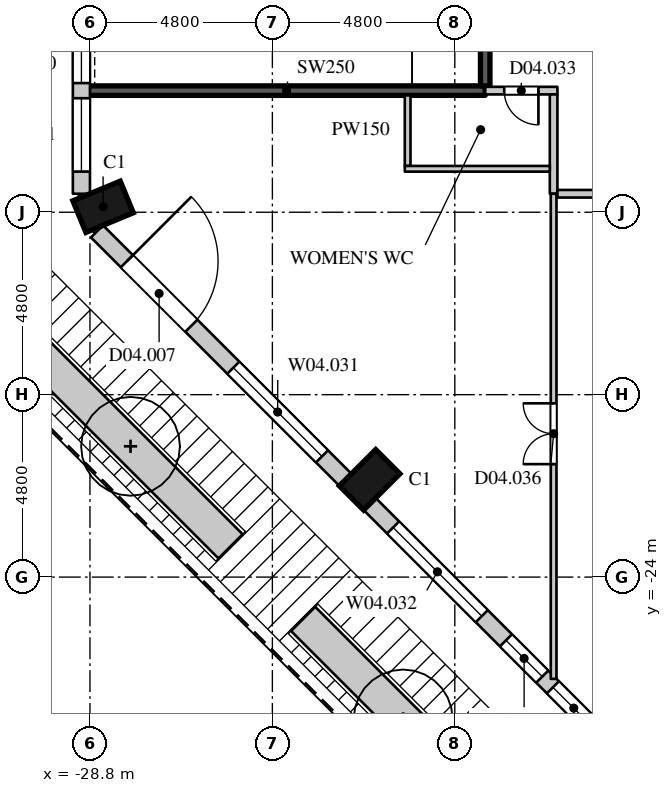
"""IFC4 building model, lengths in metres.
Left out: names, types, materials, properties, quantities, classifications, styles, units other than length and angle.
Written with IfcOpenShell. Run it as: python <this file> out.ifc"""

import sys

from ifc_helpers import new_model, si_unit, direction, frame, frame_2d, origin, origin_2d, place, context, subcontext, project, spatial, rectangle, extrude, element, fill, save


model = new_model("IFC4")
c1 = context("Model", 3, precision=1e-05, world=origin(), true_north=direction((0.0, 1.0)))
c2 = subcontext(c1, "Body", "Model", "MODEL_VIEW")
j1 = project(units=[si_unit("LENGTHUNIT", "METRE"), si_unit("PLANEANGLEUNIT", "RADIAN")], contexts=[c1])
p1 = place(None, origin())
s1 = spatial("IfcSite", under=j1, at=p1, CompositionType="ELEMENT")
p2 = place(p1, origin())
s2 = spatial("IfcBuilding", under=s1, at=p2, CompositionType="ELEMENT")
p3 = place(p2, frame((0.0, 0.0, 21.0)))
s3 = spatial("IfcBuildingStorey", under=s2, at=p3, CompositionType="ELEMENT", Elevation=21.0)
for number, where, z_axis, x_axis in (
    (1, (-28.454, -14.257, 0.0), (0.0, 0.0, 1.0), (0.383, -0.924, 0.0)),
    (2, (-21.441, -21.441, 0.0), (0.0, 0.0, 1.0), (0.707, -0.707, 0.0)),
):
    element("IfcColumn", number, at=place(p3, frame(where, z_axis=z_axis, x_axis=x_axis)), inside=s3, PredefinedType="COLUMN", context=c2, shape_type="SweptSolid", body=[
        extrude(rectangle(XDim=0.9, YDim=1.35, at=origin_2d()), origin(), (0.0, 0.0, 1.0), 4.5),
    ])
p4 = place(p3, frame((-29.025, -5.25, 0.9), z_axis=(0.0, 0.0, 1.0), x_axis=(0.0, -1.0, 0.0)))
e3 = element("IfcWall", 3, at=p4, inside=s3, PredefinedType="ELEMENTEDWALL", context=c2, shape_type="SweptSolid", body=[
    extrude(rectangle(XDim=8.663, YDim=0.45, at=frame_2d((4.332, 0.0))), origin(), (0.0, 0.0, 1.0), 3.3),
])
p5 = place(p4, frame((1.75, 0.0, 0.15)))
e4 = element("IfcOpeningElement", 4, at=p5, cuts=e3, PredefinedType="OPENING", context=c2, shape_type="SweptSolid", body=[
    extrude(rectangle(XDim=2.13, YDim=2.7, at=frame_2d((1.065, 1.35))), frame((0.0, 0.235, 0.0), z_axis=(0.0, -1.0, 0.0), x_axis=(1.0, 0.0, 0.0)), (0.0, 0.0, 1.0), 0.47),
])
p6 = place(p4, frame((4.781, 0.0, 0.15)))
e5 = element("IfcOpeningElement", 5, at=p6, cuts=e3, PredefinedType="OPENING", context=c2, shape_type="SweptSolid", body=[
    extrude(rectangle(XDim=0.97, YDim=2.7, at=frame_2d((0.485, 1.35))), frame((0.0, 0.235, 0.0), z_axis=(0.0, -1.0, 0.0), x_axis=(1.0, 0.0, 0.0)), (0.0, 0.0, 1.0), 0.47),
])
p7 = place(p4, frame((6.15, 0.0, 0.15)))
e6 = element("IfcOpeningElement", 6, at=p7, cuts=e3, PredefinedType="OPENING", context=c2, shape_type="SweptSolid", body=[
    extrude(rectangle(XDim=1.93, YDim=2.7, at=frame_2d((0.965, 1.35))), frame((0.0, 0.235, 0.0), z_axis=(0.0, -1.0, 0.0), x_axis=(1.0, 0.0, 0.0)), (0.0, 0.0, 1.0), 0.47),
])
p8 = place(p3, frame((-28.615, -14.904, 0.0), z_axis=(0.0, 0.0, 1.0), x_axis=(0.707106781187, -0.707106781187, 0.0)))
e7 = element("IfcWall", 7, at=p8, inside=s3, PredefinedType="ELEMENTEDWALL", context=c2, shape_type="SweptSolid", body=[
    extrude(rectangle(XDim=9.245, YDim=0.45, at=frame_2d((4.623, 0.0))), origin(), (0.0, 0.0, 1.0), 4.2),
])
p9 = place(p8, frame((1.111, 0.0, 0.0)))
e8 = element("IfcOpeningElement", 8, at=p9, cuts=e7, PredefinedType="OPENING", context=c2, shape_type="SweptSolid", body=[
    extrude(rectangle(XDim=2.4, YDim=2.7, at=frame_2d((1.2, 1.35))), frame((0.0, 0.235, 0.0), z_axis=(0.0, -1.0, 0.0), x_axis=(1.0, 0.0, 0.0)), (0.0, 0.0, 1.0), 0.47),
])
p10 = place(p8, frame((5.073, 0.0, 1.05)))
e9 = element("IfcOpeningElement", 9, at=p10, cuts=e7, PredefinedType="OPENING", context=c2, shape_type="SweptSolid", body=[
    extrude(rectangle(XDim=3.3, YDim=2.7, at=frame_2d((1.65, 1.35))), frame((0.0, 0.235, 0.0), z_axis=(0.0, -1.0, 0.0), x_axis=(1.0, 0.0, 0.0)), (0.0, 0.0, 1.0), 0.47),
])
p11 = place(p3, frame((-21.441, -22.077, 0.9), z_axis=(0.0, 0.0, 1.0), x_axis=(0.707106781187, -0.707106781187, 0.0)))
e10 = element("IfcWall", 10, at=p11, inside=s3, PredefinedType="ELEMENTEDWALL", context=c2, shape_type="SweptSolid", body=[
    extrude(rectangle(XDim=9.245, YDim=0.45, at=frame_2d((4.623, 0.0))), origin(), (0.0, 0.0, 1.0), 3.3),
])
p12 = place(p11, frame((0.873, 0.0, 0.15)))
e11 = element("IfcOpeningElement", 11, at=p12, cuts=e10, PredefinedType="OPENING", context=c2, shape_type="SweptSolid", body=[
    extrude(rectangle(XDim=3.3, YDim=2.7, at=frame_2d((1.65, 1.35))), frame((0.0, 0.235, 0.0), z_axis=(0.0, -1.0, 0.0), x_axis=(1.0, 0.0, 0.0)), (0.0, 0.0, 1.0), 0.47),
])
p13 = place(p11, frame((5.073, 0.0, 0.15)))
e12 = element("IfcOpeningElement", 12, at=p13, cuts=e10, PredefinedType="OPENING", context=c2, shape_type="SweptSolid", body=[
    extrude(rectangle(XDim=1.35, YDim=2.7, at=frame_2d((0.675, 1.35))), frame((0.0, 0.235, 0.0), z_axis=(0.0, -1.0, 0.0), x_axis=(1.0, 0.0, 0.0)), (0.0, 0.0, 1.0), 0.47),
])
p14 = place(p11, frame((6.821, 0.0, 0.15)))
e13 = element("IfcOpeningElement", 13, at=p14, cuts=e10, PredefinedType="OPENING", context=c2, shape_type="SweptSolid", body=[
    extrude(rectangle(XDim=1.55, YDim=2.7, at=frame_2d((0.775, 1.35))), frame((0.0, 0.235, 0.0), z_axis=(0.0, -1.0, 0.0), x_axis=(1.0, 0.0, 0.0)), (0.0, 0.0, 1.0), 0.47),
])
for number, where, z_axis, x_axis in (
    (14, (-30.365, -17.927, 0.0), (0.0, 0.0, 1.0), (0.707, -0.707, 0.0)),
    (15, (-23.191, -25.1, 0.0), (0.0, 0.0, 1.0), (0.707, -0.707, 0.0)),
):
    element("IfcWall", number, at=place(p3, frame(where, z_axis=z_axis, x_axis=x_axis)), inside=s3, PredefinedType="USERDEFINED", context=c2, shape_type="SweptSolid", body=[
        extrude(rectangle(XDim=7.445, YDim=0.9, at=frame_2d((3.723, 0.0))), origin(), (0.0, 0.0, 1.0), 0.9),
    ])
p15 = place(p3, frame((-18.4, -11.2, 0.0), z_axis=(0.0, 0.0, 1.0), x_axis=(1.0, 0.0, 0.0)))
e16 = element("IfcWall", 16, at=p15, inside=s3, PredefinedType="PARTITIONING", context=c2, shape_type="SweptSolid", body=[
    extrude(rectangle(XDim=1.9, YDim=0.2, at=frame_2d((0.95, 0.0))), origin(), (0.0, 0.0, 1.0), 3.55),
])
p16 = place(p15, frame((0.5, 0.0, 0.0)))
e17 = element("IfcOpeningElement", 17, at=p16, cuts=e16, PredefinedType="OPENING", context=c2, shape_type="SweptSolid", body=[
    extrude(rectangle(XDim=0.9, YDim=2.2, at=frame_2d((0.45, 1.1))), frame((0.0, 0.11, 0.0), z_axis=(0.0, -1.0, 0.0), x_axis=(1.0, 0.0, 0.0)), (0.0, 0.0, 1.0), 0.22),
])
p17 = place(p3, frame((-16.6, -13.914, 0.0), z_axis=(0.0, 0.0, 1.0), x_axis=(0.0, 1.0, 0.0)))
e18 = element("IfcWall", 18, at=p17, inside=s3, PredefinedType="PARTITIONING", context=c2, shape_type="SweptSolid", body=[
    extrude(rectangle(XDim=2.614, YDim=0.2, at=frame_2d((1.307, 0.0))), origin(), (0.0, 0.0, 1.0), 4.25),
])
p18 = place(p3, frame((-16.5, -13.914, 0.0), z_axis=(0.0, 0.0, 1.0), x_axis=(1.0, 0.0, 0.0)))
e19 = element("IfcWall", 19, at=p18, inside=s3, PredefinedType="PARTITIONING", context=c2, shape_type="SweptSolid", body=[
    extrude(rectangle(XDim=5.4, YDim=0.2, at=frame_2d((2.7, 0.0))), origin(), (0.0, 0.0, 1.0), 4.25),
])
p19 = place(p18, frame((1.9, 0.0, 0.0)))
e20 = element("IfcOpeningElement", 20, at=p19, cuts=e19, PredefinedType="OPENING", context=c2, shape_type="SweptSolid", body=[
    extrude(rectangle(XDim=1.6, YDim=2.4, at=frame_2d((0.8, 1.2))), frame((0.0, 0.11, 0.0), z_axis=(0.0, -1.0, 0.0), x_axis=(1.0, 0.0, 0.0)), (0.0, 0.0, 1.0), 0.22),
])
p20 = place(p3, frame((-20.441, -13.182, 0.0), z_axis=(0.0, 0.0, 1.0), x_axis=(0.0, 1.0, 0.0)))
e21 = element("IfcWall", 21, at=p20, inside=s3, PredefinedType="PARTITIONING", context=c2, shape_type="SweptSolid", body=[
    extrude(rectangle(XDim=1.857, YDim=0.15, at=frame_2d((0.928, 0.0))), origin(), (0.0, 0.0, 1.0), 4.25),
])
p21 = place(p3, frame((-20.516, -13.257, 0.0), z_axis=(0.0, 0.0, 1.0), x_axis=(1.0, 0.0, 0.0)))
e22 = element("IfcWall", 22, at=p21, inside=s3, PredefinedType="PARTITIONING", context=c2, shape_type="SweptSolid", body=[
    extrude(rectangle(XDim=3.816, YDim=0.15, at=frame_2d((1.908, 0.0))), origin(), (0.0, 0.0, 1.0), 4.25),
])
p22 = place(p3, frame((-16.6, -26.678, 0.0), z_axis=(0.0, 0.0, 1.0), x_axis=(0.0, 1.0, 0.0)))
e23 = element("IfcWall", 23, at=p22, inside=s3, PredefinedType="PARTITIONING", context=c2, shape_type="SweptSolid", body=[
    extrude(rectangle(XDim=12.764, YDim=0.15, at=frame_2d((6.382, 0.0))), origin(), (0.0, 0.0, 1.0), 4.25),
])
p23 = place(p22, frame((5.65, 0.0, 0.0)))
e24 = element("IfcOpeningElement", 24, at=p23, cuts=e23, PredefinedType="OPENING", context=c2, shape_type="SweptSolid", body=[
    extrude(rectangle(XDim=1.6, YDim=2.4, at=frame_2d((0.8, 1.2))), frame((0.0, 0.085, 0.0), z_axis=(0.0, -1.0, 0.0), x_axis=(1.0, 0.0, 0.0)), (0.0, 0.0, 1.0), 0.17),
])
p24 = place(p3, frame((-28.855, -11.2, 0.0), z_axis=(0.0, 0.0, 1.0), x_axis=(1.0, 0.0, 0.0)))
e25 = element("IfcWall", 25, at=p24, inside=s3, PredefinedType="SHEAR", context=c2, shape_type="SweptSolid", body=[
    extrude(rectangle(XDim=10.455, YDim=0.25, at=frame_2d((5.228, 0.0))), origin(), (0.0, 0.0, 1.0), 4.25),
])
p25 = place(p3, frame((-18.4, -11.075, 0.0), z_axis=(0.0, 0.0, 1.0), x_axis=(0.0, 1.0, 0.0)))
e26 = element("IfcWall", 26, at=p25, inside=s3, PredefinedType="SHEAR", context=c2, shape_type="SweptSolid", body=[
    extrude(rectangle(XDim=4.15, YDim=0.25, at=frame_2d((2.075, 0.0))), origin(), (0.0, 0.0, 1.0), 4.25),
])
p26 = place(p25, frame((1.5, 0.0, 0.0)))
e27 = element("IfcOpeningElement", 27, at=p26, cuts=e26, PredefinedType="OPENING", context=c2, shape_type="SweptSolid", body=[
    extrude(rectangle(XDim=1.1, YDim=2.2, at=frame_2d((0.55, 1.1))), frame((0.0, 0.135, 0.0), z_axis=(0.0, -1.0, 0.0), x_axis=(1.0, 0.0, 0.0)), (0.0, 0.0, 1.0), 0.27),
])
p27 = place(p6, origin())
e28 = element("IfcWindow", 28, at=p27, inside=s3, PartitioningType="SINGLE_PANEL", PredefinedType="WINDOW", context=c2, shape_type="SweptSolid", body=[
    extrude(rectangle(XDim=0.97, YDim=2.7, at=frame_2d((0.485, 1.35))), frame((0.0, 0.135, 0.0), z_axis=(0.0, -1.0, 0.0), x_axis=(1.0, 0.0, 0.0)), (0.0, 0.0, 1.0), 0.06),
])
fill(e5, e28)
p28 = place(p7, origin())
e29 = element("IfcWindow", 29, at=p28, inside=s3, PartitioningType="SINGLE_PANEL", PredefinedType="WINDOW", context=c2, shape_type="SweptSolid", body=[
    extrude(rectangle(XDim=1.93, YDim=2.7, at=frame_2d((0.965, 1.35))), frame((0.0, 0.135, 0.0), z_axis=(0.0, -1.0, 0.0), x_axis=(1.0, 0.0, 0.0)), (0.0, 0.0, 1.0), 0.06),
])
fill(e6, e29)
p29 = place(p9, origin())
e30 = element("IfcDoor", 30, at=p29, inside=s3, OperationType="SINGLE_SWING_LEFT", PredefinedType="DOOR", context=c2, shape_type="SweptSolid", body=[
    extrude(rectangle(XDim=2.4, YDim=2.7, at=frame_2d((1.2, 1.35))), frame((0.0, 0.13, 0.0), z_axis=(0.0, -1.0, 0.0), x_axis=(1.0, 0.0, 0.0)), (0.0, 0.0, 1.0), 0.05),
])
fill(e8, e30)
p30 = place(p10, origin())
e31 = element("IfcWindow", 31, at=p30, inside=s3, PartitioningType="SINGLE_PANEL", PredefinedType="WINDOW", context=c2, shape_type="SweptSolid", body=[
    extrude(rectangle(XDim=3.3, YDim=2.7, at=frame_2d((1.65, 1.35))), frame((0.0, 0.135, 0.0), z_axis=(0.0, -1.0, 0.0), x_axis=(1.0, 0.0, 0.0)), (0.0, 0.0, 1.0), 0.06),
])
fill(e9, e31)
p31 = place(p12, origin())
e32 = element("IfcWindow", 32, at=p31, inside=s3, PartitioningType="SINGLE_PANEL", PredefinedType="WINDOW", context=c2, shape_type="SweptSolid", body=[
    extrude(rectangle(XDim=3.3, YDim=2.7, at=frame_2d((1.65, 1.35))), frame((0.0, 0.135, 0.0), z_axis=(0.0, -1.0, 0.0), x_axis=(1.0, 0.0, 0.0)), (0.0, 0.0, 1.0), 0.06),
])
fill(e11, e32)
p32 = place(p13, origin())
e33 = element("IfcWindow", 33, at=p32, inside=s3, PartitioningType="SINGLE_PANEL", PredefinedType="WINDOW", context=c2, shape_type="SweptSolid", body=[
    extrude(rectangle(XDim=1.35, YDim=2.7, at=frame_2d((0.675, 1.35))), frame((0.0, 0.135, 0.0), z_axis=(0.0, -1.0, 0.0), x_axis=(1.0, 0.0, 0.0)), (0.0, 0.0, 1.0), 0.06),
])
fill(e12, e33)
p33 = place(p14, origin())
e34 = element("IfcWindow", 34, at=p33, inside=s3, PartitioningType="SINGLE_PANEL", PredefinedType="WINDOW", context=c2, shape_type="SweptSolid", body=[
    extrude(rectangle(XDim=1.55, YDim=2.7, at=frame_2d((0.775, 1.35))), frame((0.0, 0.135, 0.0), z_axis=(0.0, -1.0, 0.0), x_axis=(1.0, 0.0, 0.0)), (0.0, 0.0, 1.0), 0.06),
])
fill(e13, e34)
p34 = place(p16, origin())
e35 = element("IfcDoor", 35, at=p34, inside=s3, OperationType="SINGLE_SWING_LEFT", PredefinedType="DOOR", context=c2, shape_type="SweptSolid", body=[
    extrude(rectangle(XDim=0.9, YDim=2.2, at=frame_2d((0.45, 1.1))), frame((0.0, 0.025, 0.0), z_axis=(0.0, -1.0, 0.0), x_axis=(1.0, 0.0, 0.0)), (0.0, 0.0, 1.0), 0.05),
])
fill(e17, e35)
p35 = place(p23, origin())
e36 = element("IfcDoor", 36, at=p35, inside=s3, OperationType="DOUBLE_DOOR_SINGLE_SWING", PredefinedType="DOOR", context=c2, shape_type="SweptSolid", body=[
    extrude(rectangle(XDim=1.6, YDim=2.4, at=frame_2d((0.8, 1.2))), frame((0.0, 0.025, 0.0), z_axis=(0.0, -1.0, 0.0), x_axis=(1.0, 0.0, 0.0)), (0.0, 0.0, 1.0), 0.05),
])
fill(e24, e36)
save(model, sys.argv[1])
